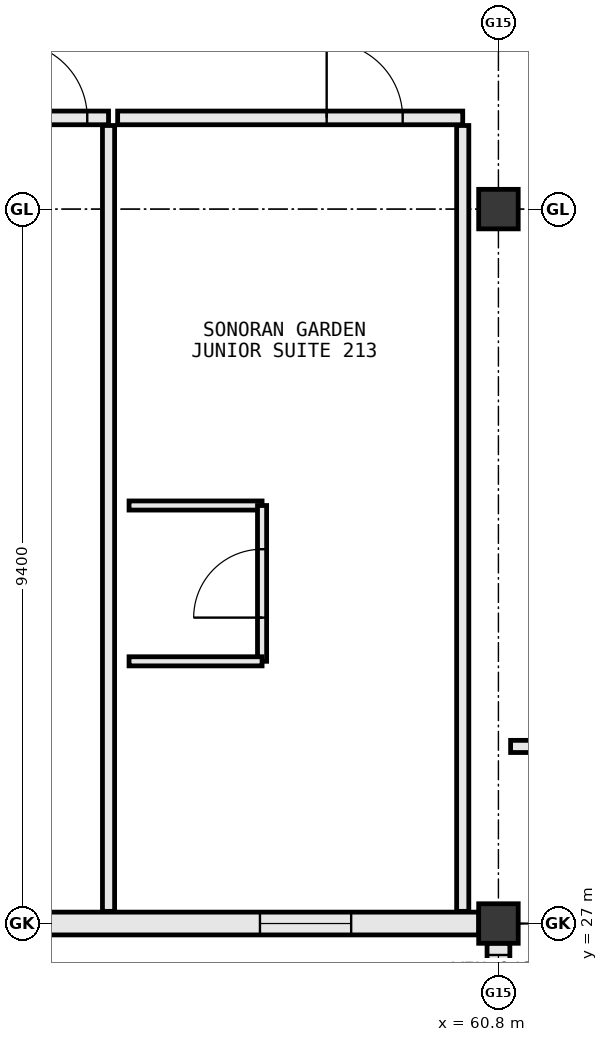
"""IFC4 building model, lengths in metres.
Left out: names, types, materials, properties, quantities, classifications, styles, units other than length and angle.
Written with IfcOpenShell. Run it as: python <this file> out.ifc"""

import sys

from ifc_helpers import new_model, si_unit, direction, frame, frame_2d, origin, origin_2d, place, context, subcontext, project, spatial, rectangle, extrude, element, fill, save


model = new_model("IFC4")
c1 = context("Model", 3, precision=1e-05, world=origin(), true_north=direction((0.0, 1.0)))
c2 = subcontext(c1, "Body", "Model", "MODEL_VIEW")
j1 = project(units=[si_unit("LENGTHUNIT", "METRE"), si_unit("PLANEANGLEUNIT", "RADIAN")], contexts=[c1])
p1 = place(None, origin())
s1 = spatial("IfcSite", under=j1, at=p1, CompositionType="ELEMENT")
p2 = place(p1, origin())
s2 = spatial("IfcBuilding", under=s1, at=p2, CompositionType="ELEMENT")
p3 = place(p2, frame((0.0, 0.0, 27.6)))
s3 = spatial("IfcBuildingStorey", under=s2, at=p3, CompositionType="ELEMENT", Elevation=27.6)
for number, where, z_axis, x_axis in (
    (1, (60.8, 27.0, 0.0), (0.0, 0.0, 1.0), (1.0, 0.0, 0.0)),
    (2, (60.8, 36.4, 0.0), (0.0, 0.0, 1.0), (1.0, 0.0, 0.0)),
):
    element("IfcColumn", number, at=place(p3, frame(where, z_axis=z_axis, x_axis=x_axis)), inside=s3, PredefinedType="COLUMN", context=c2, shape_type="SweptSolid", body=[
        extrude(rectangle(XDim=0.52, YDim=0.52, at=origin_2d()), origin(), (0.0, 0.0, 1.0), 3.8),
    ])
p4 = place(p3, frame((51.423, 27.0, 0.0), z_axis=(0.0, 0.0, 1.0), x_axis=(1.0, 0.0, 0.0)))
e3 = element("IfcWall", 3, at=p4, inside=s3, PredefinedType="STANDARD", context=c2, shape_type="SweptSolid", body=[
    extrude(rectangle(XDim=9.119, YDim=0.3, at=frame_2d((4.56, 0.0))), origin(), (0.0, 0.0, 1.0), 2.83),
])
p5 = place(p4, frame((1.68, 0.0, 0.85)))
e4 = element("IfcOpeningElement", 4, at=p5, cuts=e3, PredefinedType="OPENING", context=c2, shape_type="SweptSolid", body=[
    extrude(rectangle(XDim=1.2, YDim=1.55, at=frame_2d((0.6, 0.775))), frame((0.0, 0.162, 0.0), z_axis=(0.0, -1.0, 0.0), x_axis=(1.0, 0.0, 0.0)), (0.0, 0.0, 1.0), 0.324),
])
p6 = place(p4, frame((6.239, 0.0, 0.85)))
e5 = element("IfcOpeningElement", 5, at=p6, cuts=e3, PredefinedType="OPENING", context=c2, shape_type="SweptSolid", body=[
    extrude(rectangle(XDim=1.2, YDim=1.55, at=frame_2d((0.6, 0.775))), frame((0.0, 0.162, 0.0), z_axis=(0.0, -1.0, 0.0), x_axis=(1.0, 0.0, 0.0)), (0.0, 0.0, 1.0), 0.324),
])
p7 = place(p3, frame((60.8, 26.742, 0.0), z_axis=(0.0, 0.0, 1.0), x_axis=(0.0, -1.0, 0.0)))
e6 = element("IfcWall", 6, at=p7, inside=s3, PredefinedType="STANDARD", context=c2, shape_type="SweptSolid", body=[
    extrude(rectangle(XDim=7.884, YDim=0.3, at=frame_2d((3.942, 0.0))), origin(), (0.0, 0.0, 1.0), 3.01),
])
p8 = place(p7, frame((5.082, 0.0, 0.85)))
e7 = element("IfcOpeningElement", 7, at=p8, cuts=e6, PredefinedType="OPENING", context=c2, shape_type="SweptSolid", body=[
    extrude(rectangle(XDim=1.8, YDim=1.85, at=frame_2d((0.9, 0.925))), frame((0.0, 0.162, 0.0), z_axis=(0.0, -1.0, 0.0), x_axis=(1.0, 0.0, 0.0)), (0.0, 0.0, 1.0), 0.324),
])
p9 = place(p7, frame((1.622, 0.0, 0.85)))
e8 = element("IfcOpeningElement", 8, at=p9, cuts=e6, PredefinedType="OPENING", context=c2, shape_type="SweptSolid", body=[
    extrude(rectangle(XDim=1.8, YDim=1.85, at=frame_2d((0.9, 0.925))), frame((0.0, 0.162, 0.0), z_axis=(0.0, -1.0, 0.0), x_axis=(1.0, 0.0, 0.0)), (0.0, 0.0, 1.0), 0.324),
])
p10 = place(p7, frame((0.156, 0.0, 0.85)))
e9 = element("IfcOpeningElement", 9, at=p10, cuts=e6, PredefinedType="OPENING", context=c2, shape_type="SweptSolid", body=[
    extrude(rectangle(XDim=0.42, YDim=1.4, at=frame_2d((0.21, 0.7))), frame((0.0, 0.162, 0.0), z_axis=(0.0, -1.0, 0.0), x_axis=(1.0, 0.0, 0.0)), (0.0, 0.0, 1.0), 0.324),
])
p11 = place(p3, frame((60.96, 29.33, 0.0), z_axis=(0.0, 0.0, 1.0), x_axis=(1.0, 0.0, 0.0)))
e10 = element("IfcWall", 10, at=p11, inside=s3, PredefinedType="PARTITIONING", context=c2, shape_type="SweptSolid", body=[
    extrude(rectangle(XDim=6.94, YDim=0.16, at=frame_2d((3.47, 0.0))), origin(), (0.0, 0.0, 1.0), 3.555),
])
p12 = place(p3, frame((55.67, 37.6, 0.0), z_axis=(0.0, 0.0, 1.0), x_axis=(-1.0, 0.0, 0.0)))
e11 = element("IfcWall", 11, at=p12, inside=s3, PredefinedType="PARTITIONING", context=c2, shape_type="SweptSolid", body=[
    extrude(rectangle(XDim=3.34, YDim=0.18, at=frame_2d((1.67, 0.0))), origin(), (0.0, 0.0, 1.0), 3.555),
])
p13 = place(p12, frame((0.28, 0.0, 0.0)))
e12 = element("IfcOpeningElement", 12, at=p13, cuts=e11, PredefinedType="OPENING", context=c2, shape_type="SweptSolid", body=[
    extrude(rectangle(XDim=1.0, YDim=2.2, at=frame_2d((0.5, 1.1))), frame((0.0, 0.102, 0.0), z_axis=(0.0, -1.0, 0.0), x_axis=(1.0, 0.0, 0.0)), (0.0, 0.0, 1.0), 0.204),
])
p14 = place(p3, frame((55.67, 27.16, 0.0), z_axis=(0.0, 0.0, 1.0), x_axis=(0.0, 1.0, 0.0)))
e13 = element("IfcWall", 13, at=p14, inside=s3, PredefinedType="PARTITIONING", context=c2, shape_type="SweptSolid", body=[
    extrude(rectangle(XDim=10.34, YDim=0.16, at=frame_2d((5.17, 0.0))), origin(), (0.0, 0.0, 1.0), 3.555),
])
p15 = place(p3, frame((60.33, 37.6, 0.0), z_axis=(0.0, 0.0, 1.0), x_axis=(-1.0, 0.0, 0.0)))
e14 = element("IfcWall", 14, at=p15, inside=s3, PredefinedType="PARTITIONING", context=c2, shape_type="SweptSolid", body=[
    extrude(rectangle(XDim=4.54, YDim=0.18, at=frame_2d((2.27, 0.0))), origin(), (0.0, 0.0, 1.0), 3.555),
])
p16 = place(p15, frame((0.79, 0.0, 0.0)))
e15 = element("IfcOpeningElement", 15, at=p16, cuts=e14, PredefinedType="OPENING", context=c2, shape_type="SweptSolid", body=[
    extrude(rectangle(XDim=1.0, YDim=2.2, at=frame_2d((0.5, 1.1))), frame((0.0, 0.102, 0.0), z_axis=(0.0, -1.0, 0.0), x_axis=(1.0, 0.0, 0.0)), (0.0, 0.0, 1.0), 0.204),
])
p17 = place(p3, frame((60.33, 27.16, 0.0), z_axis=(0.0, 0.0, 1.0), x_axis=(0.0, 1.0, 0.0)))
e16 = element("IfcWall", 16, at=p17, inside=s3, PredefinedType="PARTITIONING", context=c2, shape_type="SweptSolid", body=[
    extrude(rectangle(XDim=10.34, YDim=0.16, at=frame_2d((5.17, 0.0))), origin(), (0.0, 0.0, 1.0), 3.555),
])
p18 = place(p3, frame((55.94, 32.5, 0.0), z_axis=(0.0, 0.0, 1.0), x_axis=(1.0, 0.0, 0.0)))
e17 = element("IfcWall", 17, at=p18, inside=s3, PredefinedType="PARTITIONING", context=c2, shape_type="SweptSolid", body=[
    extrude(rectangle(XDim=1.75, YDim=0.12, at=frame_2d((0.875, 0.0))), origin(), (0.0, 0.0, 1.0), 3.555),
])
p19 = place(p3, frame((57.69, 30.45, 0.0), z_axis=(0.0, 0.0, 1.0), x_axis=(0.0, 1.0, 0.0)))
e18 = element("IfcWall", 18, at=p19, inside=s3, PredefinedType="PARTITIONING", context=c2, shape_type="SweptSolid", body=[
    extrude(rectangle(XDim=2.05, YDim=0.12, at=frame_2d((1.025, 0.0))), origin(), (0.0, 0.0, 1.0), 3.1),
])
p20 = place(p19, frame((0.575, 0.0, 0.0)))
e19 = element("IfcOpeningElement", 19, at=p20, cuts=e18, PredefinedType="OPENING", context=c2, shape_type="SweptSolid", body=[
    extrude(rectangle(XDim=0.9, YDim=2.15, at=frame_2d((0.45, 1.075))), frame((0.0, 0.072, 0.0), z_axis=(0.0, -1.0, 0.0), x_axis=(1.0, 0.0, 0.0)), (0.0, 0.0, 1.0), 0.144),
])
p21 = place(p3, frame((55.94, 30.45, 0.0), z_axis=(0.0, 0.0, 1.0), x_axis=(1.0, 0.0, 0.0)))
e20 = element("IfcWall", 20, at=p21, inside=s3, PredefinedType="PARTITIONING", context=c2, shape_type="SweptSolid", body=[
    extrude(rectangle(XDim=1.75, YDim=0.12, at=frame_2d((0.875, 0.0))), origin(), (0.0, 0.0, 1.0), 3.555),
])
p22 = place(p6, origin())
e21 = element("IfcWindow", 21, at=p22, inside=s3, PartitioningType="SINGLE_PANEL", PredefinedType="WINDOW", context=c2, shape_type="SweptSolid", body=[
    extrude(rectangle(XDim=1.2, YDim=1.55, at=frame_2d((0.6, 0.775))), frame((0.0, 0.03, 0.0), z_axis=(0.0, -1.0, 0.0), x_axis=(1.0, 0.0, 0.0)), (0.0, 0.0, 1.0), 0.06),
])
fill(e5, e21)
p23 = place(p10, origin())
e22 = element("IfcWindow", 22, at=p23, inside=s3, PartitioningType="SINGLE_PANEL", PredefinedType="WINDOW", context=c2, shape_type="SweptSolid", body=[
    extrude(rectangle(XDim=0.42, YDim=1.4, at=frame_2d((0.21, 0.7))), frame((0.0, 0.03, 0.0), z_axis=(0.0, -1.0, 0.0), x_axis=(1.0, 0.0, 0.0)), (0.0, 0.0, 1.0), 0.06),
])
fill(e9, e22)
p24 = place(p13, frame((1.0, 0.0, 0.0), z_axis=(0.0, 0.0, 1.0), x_axis=(-1.0, 0.0, 0.0)))
e23 = element("IfcDoor", 23, at=p24, inside=s3, OperationType="SINGLE_SWING_RIGHT", PredefinedType="DOOR", context=c2, shape_type="SweptSolid", body=[
    extrude(rectangle(XDim=1.0, YDim=2.2, at=frame_2d((0.5, 1.1))), frame((0.0, 0.025, 0.0), z_axis=(0.0, -1.0, 0.0), x_axis=(1.0, 0.0, 0.0)), (0.0, 0.0, 1.0), 0.05),
])
fill(e12, e23)
p25 = place(p16, frame((1.0, 0.0, 0.0), z_axis=(0.0, 0.0, 1.0), x_axis=(-1.0, 0.0, 0.0)))
e24 = element("IfcDoor", 24, at=p25, inside=s3, OperationType="SINGLE_SWING_RIGHT", PredefinedType="DOOR", context=c2, shape_type="SweptSolid", body=[
    extrude(rectangle(XDim=1.0, YDim=2.2, at=frame_2d((0.5, 1.1))), frame((0.0, 0.025, 0.0), z_axis=(0.0, -1.0, 0.0), x_axis=(1.0, 0.0, 0.0)), (0.0, 0.0, 1.0), 0.05),
])
fill(e15, e24)
p26 = place(p20, origin())
e25 = element("IfcDoor", 25, at=p26, inside=s3, OperationType="SINGLE_SWING_LEFT", PredefinedType="DOOR", context=c2, shape_type="SweptSolid", body=[
    extrude(rectangle(XDim=0.9, YDim=2.15, at=frame_2d((0.45, 1.075))), frame((0.0, 0.025, 0.0), z_axis=(0.0, -1.0, 0.0), x_axis=(1.0, 0.0, 0.0)), (0.0, 0.0, 1.0), 0.05),
])
fill(e19, e25)
save(model, sys.argv[1])
